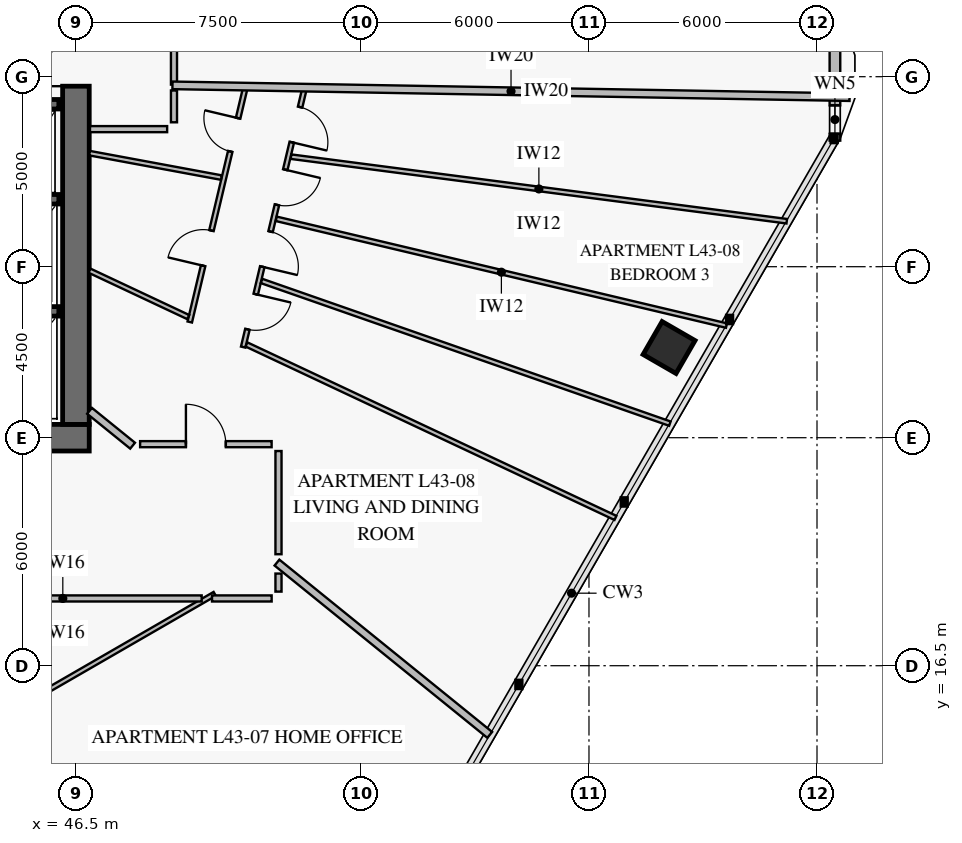
"""IFC4 building model, lengths in metres.
Left out: names, types, materials, properties, quantities, classifications, styles, units other than length and angle.
Written with IfcOpenShell. Run it as: python <this file> out.ifc"""

import sys

from ifc_helpers import new_model, si_unit, direction, frame, frame_2d, origin, origin_2d, place, context, subcontext, project, spatial, rectangle, extrude, element, fill, save


model = new_model("IFC4")
c1 = context("Model", 3, precision=1e-05, world=origin(), true_north=direction((0.0, 1.0)))
c2 = subcontext(c1, "Body", "Model", "MODEL_VIEW")
j1 = project(units=[si_unit("LENGTHUNIT", "METRE"), si_unit("PLANEANGLEUNIT", "RADIAN")], contexts=[c1])
p1 = place(None, origin())
s1 = spatial("IfcSite", under=j1, at=p1, CompositionType="ELEMENT")
p2 = place(p1, origin())
s2 = spatial("IfcBuilding", under=s1, at=p2, CompositionType="ELEMENT")
p3 = place(p2, frame((0.0, 0.0, 173.2)))
s3 = spatial("IfcBuildingStorey", under=s2, at=p3, CompositionType="ELEMENT", Elevation=173.2)
p4 = place(p3, frame((37.35, 22.5, 0.0), z_axis=(0.0, 0.0, 1.0), x_axis=(1.0, 0.0, 0.0)))
e1 = element("IfcWall", 1, at=p4, inside=s3, PredefinedType="SHEAR", context=c2, shape_type="SweptSolid", body=[
    extrude(rectangle(XDim=9.5, YDim=0.7, at=frame_2d((4.75, 0.0))), origin(), (0.0, 0.0, 1.0), 3.8),
])
p5 = place(p4, frame((3.95, 0.0, 0.0)))
e2 = element("IfcOpeningElement", 2, at=p5, cuts=e1, PredefinedType="OPENING", context=c2, shape_type="SweptSolid", body=[
    extrude(rectangle(XDim=1.5, YDim=2.15, at=frame_2d((0.75, 1.075))), frame((0.0, 0.362, 0.0), z_axis=(0.0, -1.0, 0.0), x_axis=(1.0, 0.0, 0.0)), (0.0, 0.0, 1.0), 0.724),
])
p6 = place(p3, frame((46.5, 22.85, 0.0), z_axis=(0.0, 0.0, 1.0), x_axis=(0.0, 1.0, 0.0)))
e3 = element("IfcWall", 3, at=p6, inside=s3, PredefinedType="SHEAR", context=c2, shape_type="SweptSolid", body=[
    extrude(rectangle(XDim=18.3, YDim=0.7, at=frame_2d((9.15, 0.0))), origin(), (0.0, 0.0, 1.0), 3.8),
])
p7 = place(p6, frame((8.9, 0.0, 0.0)))
e4 = element("IfcOpeningElement", 4, at=p7, cuts=e3, PredefinedType="OPENING", context=c2, shape_type="SweptSolid", body=[
    extrude(rectangle(XDim=1.1, YDim=2.15, at=frame_2d((0.55, 1.075))), frame((0.0, 0.362, 0.0), z_axis=(0.0, -1.0, 0.0), x_axis=(1.0, 0.0, 0.0)), (0.0, 0.0, 1.0), 0.724),
])
p8 = place(p3, frame((62.108, 24.874, 0.0), z_axis=(0.0, 0.0, 1.0), x_axis=(0.5, 0.866025403784, 0.0)))
e5 = element("IfcColumn", 5, at=p8, inside=s3, PredefinedType="COLUMN", context=c2, shape_type="SweptSolid", body=[
    extrude(rectangle(XDim=1.0, YDim=1.0, at=origin_2d()), origin(), (0.0, 0.0, 1.0), 3.55),
])
p9 = place(p3, frame((66.472, 33.683, 0.0), z_axis=(0.0, 0.0, 1.0), x_axis=(0.0, -1.0, 0.0)))
e6 = element("IfcWall", 6, at=p9, inside=s3, PredefinedType="SOLIDWALL", context=c2, shape_type="SweptSolid", body=[
    extrude(rectangle(XDim=3.365, YDim=0.28, at=frame_2d((1.683, 0.0))), origin(), (0.0, 0.0, 1.0), 3.55),
])
p10 = place(p9, frame((2.436, 0.0, 0.85)))
e7 = element("IfcOpeningElement", 7, at=p10, cuts=e6, PredefinedType="OPENING", context=c2, shape_type="SweptSolid", body=[
    extrude(rectangle(XDim=0.75, YDim=1.5, at=frame_2d((0.375, 0.75))), frame((0.0, 0.152, 0.0), z_axis=(0.0, -1.0, 0.0), x_axis=(1.0, 0.0, 0.0)), (0.0, 0.0, 1.0), 0.304),
])
p11 = place(p3, frame((25.95, 31.275, 0.0), z_axis=(0.0, 0.0, 1.0), x_axis=(1.0, 0.0, 0.0)))
e8 = element("IfcWall", 8, at=p11, inside=s3, PredefinedType="SOLIDWALL", context=c2, shape_type="SweptSolid", body=[
    extrude(rectangle(XDim=20.1, YDim=0.25, at=frame_2d((10.05, 0.0))), origin(), (0.0, 0.0, 1.0), 3.8),
])
p12 = place(p11, frame((2.6, 0.0, 0.0)))
e9 = element("IfcOpeningElement", 9, at=p12, cuts=e8, PredefinedType="OPENING", context=c2, shape_type="SweptSolid", body=[
    extrude(rectangle(XDim=1.1, YDim=2.15, at=frame_2d((0.55, 1.075))), frame((0.0, 0.137, 0.0), z_axis=(0.0, -1.0, 0.0), x_axis=(1.0, 0.0, 0.0)), (0.0, 0.0, 1.0), 0.274),
])
p13 = place(p11, frame((10.6, 0.0, 0.0)))
e10 = element("IfcOpeningElement", 10, at=p13, cuts=e8, PredefinedType="OPENING", context=c2, shape_type="SweptSolid", body=[
    extrude(rectangle(XDim=1.1, YDim=2.15, at=frame_2d((0.55, 1.075))), frame((0.0, 0.137, 0.0), z_axis=(0.0, -1.0, 0.0), x_axis=(1.0, 0.0, 0.0)), (0.0, 0.0, 1.0), 0.274),
])
p14 = place(p11, frame((16.35, 0.0, 0.0)))
e11 = element("IfcOpeningElement", 11, at=p14, cuts=e8, PredefinedType="OPENING", context=c2, shape_type="SweptSolid", body=[
    extrude(rectangle(XDim=1.1, YDim=2.15, at=frame_2d((0.55, 1.075))), frame((0.0, 0.137, 0.0), z_axis=(0.0, -1.0, 0.0), x_axis=(1.0, 0.0, 0.0)), (0.0, 0.0, 1.0), 0.274),
])
for number, where, z_axis, x_axis in (
    (12, (43.8, 25.825, 0.0), (0.0, 0.0, 1.0), (1.0, 0.0, 0.0)),
    (13, (43.8, 28.775, 0.0), (0.0, 0.0, 1.0), (1.0, 0.0, 0.0)),
):
    element("IfcWall", number, at=place(p3, frame(where, z_axis=z_axis, x_axis=x_axis)), inside=s3, PredefinedType="SOLIDWALL", context=c2, shape_type="SweptSolid", body=[
        extrude(rectangle(XDim=2.25, YDim=0.25, at=frame_2d((1.125, 0.0))), origin(), (0.0, 0.0, 1.0), 3.8),
    ])
p15 = place(p3, frame((44.036, 14.83, 0.0), z_axis=(0.0, 0.0, 1.0), x_axis=(0.423895538652, -0.905711086556, 0.0)))
e14 = element("IfcWall", 14, at=p15, inside=s3, PredefinedType="PARTITIONING", context=c2, shape_type="SweptSolid", body=[
    extrude(rectangle(XDim=8.413, YDim=0.12, at=frame_2d((4.207, 0.0))), origin(), (0.0, 0.0, 1.0), 2.87),
])
p16 = place(p15, frame((3.707, 0.0, 0.0)))
e15 = element("IfcOpeningElement", 15, at=p16, cuts=e14, PredefinedType="OPENING", context=c2, shape_type="SweptSolid", body=[
    extrude(rectangle(XDim=0.95, YDim=2.1, at=frame_2d((0.475, 1.05))), frame((0.0, 0.072, 0.0), z_axis=(0.0, -1.0, 0.0), x_axis=(1.0, 0.0, 0.0)), (0.0, 0.0, 1.0), 0.144),
])
p17 = place(p3, frame((49.496, 25.545, 0.0), z_axis=(0.0, 0.0, 1.0), x_axis=(0.230738150412, 0.973015881651, 0.0)))
e16 = element("IfcWall", 16, at=p17, inside=s3, PredefinedType="PARTITIONING", context=c2, shape_type="SweptSolid", body=[
    extrude(rectangle(XDim=6.335, YDim=0.12, at=frame_2d((3.167, 0.0))), origin(), (0.0, 0.0, 1.0), 2.9),
])
p18 = place(p17, frame((1.523, 0.0, 0.0)))
e17 = element("IfcOpeningElement", 17, at=p18, cuts=e16, PredefinedType="OPENING", context=c2, shape_type="SweptSolid", body=[
    extrude(rectangle(XDim=0.95, YDim=2.1, at=frame_2d((0.475, 1.05))), frame((0.0, 0.072, 0.0), z_axis=(0.0, -1.0, 0.0), x_axis=(1.0, 0.0, 0.0)), (0.0, 0.0, 1.0), 0.144),
])
p19 = place(p17, frame((4.613, 0.0, 0.0)))
e18 = element("IfcOpeningElement", 18, at=p19, cuts=e16, PredefinedType="OPENING", context=c2, shape_type="SweptSolid", body=[
    extrude(rectangle(XDim=0.9, YDim=2.1, at=frame_2d((0.45, 1.05))), frame((0.0, 0.072, 0.0), z_axis=(0.0, -1.0, 0.0), x_axis=(1.0, 0.0, 0.0)), (0.0, 0.0, 1.0), 0.144),
])
p20 = place(p3, frame((50.901, 24.884, 0.0), z_axis=(0.0, 0.0, 1.0), x_axis=(0.230727269758, 0.973018461793, 0.0)))
e19 = element("IfcWall", 19, at=p20, inside=s3, PredefinedType="PARTITIONING", context=c2, shape_type="SweptSolid", body=[
    extrude(rectangle(XDim=6.972, YDim=0.12, at=frame_2d((3.486, 0.0))), origin(), (0.0, 0.0, 1.0), 2.9),
])
p21 = place(p20, frame((0.481, 0.0, 0.0)))
e20 = element("IfcOpeningElement", 20, at=p21, cuts=e19, PredefinedType="OPENING", context=c2, shape_type="SweptSolid", body=[
    extrude(rectangle(XDim=0.95, YDim=2.1, at=frame_2d((0.475, 1.05))), frame((0.0, 0.072, 0.0), z_axis=(0.0, -1.0, 0.0), x_axis=(1.0, 0.0, 0.0)), (0.0, 0.0, 1.0), 0.144),
])
p22 = place(p20, frame((2.174, 0.0, 0.0)))
e21 = element("IfcOpeningElement", 21, at=p22, cuts=e19, PredefinedType="OPENING", context=c2, shape_type="SweptSolid", body=[
    extrude(rectangle(XDim=0.95, YDim=2.1, at=frame_2d((0.475, 1.05))), frame((0.0, 0.072, 0.0), z_axis=(0.0, -1.0, 0.0), x_axis=(1.0, 0.0, 0.0)), (0.0, 0.0, 1.0), 0.144),
])
p23 = place(p20, frame((3.848, 0.0, 0.0)))
e22 = element("IfcOpeningElement", 22, at=p23, cuts=e19, PredefinedType="OPENING", context=c2, shape_type="SweptSolid", body=[
    extrude(rectangle(XDim=0.95, YDim=2.1, at=frame_2d((0.475, 1.05))), frame((0.0, 0.072, 0.0), z_axis=(0.0, -1.0, 0.0), x_axis=(1.0, 0.0, 0.0)), (0.0, 0.0, 1.0), 0.144),
])
p24 = place(p20, frame((5.541, 0.0, 0.0)))
e23 = element("IfcOpeningElement", 23, at=p24, cuts=e19, PredefinedType="OPENING", context=c2, shape_type="SweptSolid", body=[
    extrude(rectangle(XDim=0.95, YDim=2.1, at=frame_2d((0.475, 1.05))), frame((0.0, 0.072, 0.0), z_axis=(0.0, -1.0, 0.0), x_axis=(1.0, 0.0, 0.0)), (0.0, 0.0, 1.0), 0.144),
])
p25 = place(p3, frame((51.649, 22.33, 0.0), z_axis=(0.0, 0.0, 1.0), x_axis=(-1.0, 0.0, 0.0)))
e24 = element("IfcWall", 24, at=p25, inside=s3, PredefinedType="PARTITIONING", context=c2, shape_type="SweptSolid", body=[
    extrude(rectangle(XDim=3.46, YDim=0.16, at=frame_2d((1.73, 0.0))), origin(), (0.0, 0.0, 1.0), 3.55),
])
p26 = place(p25, frame((1.205, 0.0, 0.0)))
e25 = element("IfcOpeningElement", 25, at=p26, cuts=e24, PredefinedType="OPENING", context=c2, shape_type="SweptSolid", body=[
    extrude(rectangle(XDim=1.05, YDim=2.15, at=frame_2d((0.525, 1.075))), frame((0.0, 0.092, 0.0), z_axis=(0.0, -1.0, 0.0), x_axis=(1.0, 0.0, 0.0)), (0.0, 0.0, 1.0), 0.184),
])
p27 = place(p3, frame((49.08, 31.792, 0.0), z_axis=(0.0, 0.0, 1.0), x_axis=(0.0, 1.0, 0.0)))
e26 = element("IfcWall", 26, at=p27, inside=s3, PredefinedType="PARTITIONING", context=c2, shape_type="SweptSolid", body=[
    extrude(rectangle(XDim=9.878, YDim=0.16, at=frame_2d((4.939, 0.0))), origin(), (0.0, 0.0, 1.0), 2.9),
])
p28 = place(p27, frame((4.364, 0.0, 0.0)))
e27 = element("IfcOpeningElement", 27, at=p28, cuts=e26, PredefinedType="OPENING", context=c2, shape_type="SweptSolid", body=[
    extrude(rectangle(XDim=1.15, YDim=2.2, at=frame_2d((0.575, 1.1))), frame((0.0, 0.092, 0.0), z_axis=(0.0, -1.0, 0.0), x_axis=(1.0, 0.0, 0.0)), (0.0, 0.0, 1.0), 0.184),
])
p29 = place(p3, frame((44.084, 14.886, 0.0), z_axis=(0.0, 0.0, 1.0), x_axis=(0.866034731829, 0.499983843005, 0.0)))
e28 = element("IfcWall", 28, at=p29, inside=s3, PredefinedType="PARTITIONING", context=c2, shape_type="SweptSolid", body=[
    extrude(rectangle(XDim=7.007, YDim=0.12, at=frame_2d((3.503, 0.0))), origin(), (0.0, 0.0, 1.0), 2.9),
])
p30 = place(p3, frame((46.858, 23.207, 0.0), z_axis=(0.0, 0.0, 1.0), x_axis=(0.777244870707, -0.629198228668, 0.0)))
e29 = element("IfcWall", 29, at=p30, inside=s3, PredefinedType="PARTITIONING", context=c2, shape_type="SweptSolid", body=[
    extrude(rectangle(XDim=1.458, YDim=0.2, at=frame_2d((0.729, 0.0))), origin(), (0.0, 0.0, 1.0), 3.55),
])
p31 = place(p3, frame((51.79, 19.213, 0.0), z_axis=(0.0, 0.0, 1.0), x_axis=(0.777161996324, -0.629300589122, 0.0)))
e30 = element("IfcWall", 30, at=p31, inside=s3, PredefinedType="PARTITIONING", context=c2, shape_type="SweptSolid", body=[
    extrude(rectangle(XDim=7.204, YDim=0.2, at=frame_2d((3.602, 0.0))), origin(), (0.0, 0.0, 1.0), 2.87),
])
p32 = place(p3, frame((46.858, 29.988, 0.0), z_axis=(0.0, 0.0, 1.0), x_axis=(0.983273284931, -0.182136342173, 0.0)))
e31 = element("IfcWall", 31, at=p32, inside=s3, PredefinedType="PARTITIONING", context=c2, shape_type="SweptSolid", body=[
    extrude(rectangle(XDim=3.528, YDim=0.12, at=frame_2d((1.764, 0.0))), origin(), (0.0, 0.0, 1.0), 3.55),
])
p33 = place(p3, frame((51.384, 26.625, 0.0), z_axis=(0.0, 0.0, 1.0), x_axis=(0.944033449878, -0.329849731714, 0.0)))
e32 = element("IfcWall", 32, at=p33, inside=s3, PredefinedType="PARTITIONING", context=c2, shape_type="SweptSolid", body=[
    extrude(rectangle(XDim=11.382, YDim=0.12, at=frame_2d((5.691, 0.0))), origin(), (0.0, 0.0, 1.0), 2.87),
])
p34 = place(p3, frame((51.772, 28.26, 0.0), z_axis=(0.0, 0.0, 1.0), x_axis=(0.973016228648, -0.230736687131, 0.0)))
e33 = element("IfcWall", 33, at=p34, inside=s3, PredefinedType="PARTITIONING", context=c2, shape_type="SweptSolid", body=[
    extrude(rectangle(XDim=12.176, YDim=0.12, at=frame_2d((6.088, 0.0))), origin(), (0.0, 0.0, 1.0), 2.87),
])
p35 = place(p3, frame((52.159, 29.896, 0.0), z_axis=(0.0, 0.0, 1.0), x_axis=(0.991627193539, -0.129133686673, 0.0)))
e34 = element("IfcWall", 34, at=p35, inside=s3, PredefinedType="PARTITIONING", context=c2, shape_type="SweptSolid", body=[
    extrude(rectangle(XDim=13.155, YDim=0.12, at=frame_2d((6.577, 0.0))), origin(), (0.0, 0.0, 1.0), 2.87),
])
p36 = place(p3, frame((46.858, 26.895, 0.0), z_axis=(0.0, 0.0, 1.0), x_axis=(0.904965101131, -0.425485799686, 0.0)))
e35 = element("IfcWall", 35, at=p36, inside=s3, PredefinedType="PARTITIONING", context=c2, shape_type="SweptSolid", body=[
    extrude(rectangle(XDim=2.871, YDim=0.12, at=frame_2d((1.436, 0.0))), origin(), (0.0, 0.0, 1.0), 3.55),
])
p37 = place(p3, frame((50.988, 24.954, 0.0), z_axis=(0.0, 0.0, 1.0), x_axis=(0.904984187351, -0.42544520287, 0.0)))
e36 = element("IfcWall", 36, at=p37, inside=s3, PredefinedType="PARTITIONING", context=c2, shape_type="SweptSolid", body=[
    extrude(rectangle(XDim=10.728, YDim=0.12, at=frame_2d((5.364, 0.0))), origin(), (0.0, 0.0, 1.0), 2.87),
])
p38 = place(p3, frame((49.04, 31.772, 0.0), z_axis=(0.0, 0.0, 1.0), x_axis=(0.999847668402, -0.017453939101, 0.0)))
e37 = element("IfcWall", 37, at=p38, inside=s3, PredefinedType="PARTITIONING", context=c2, shape_type="SweptSolid", body=[
    extrude(rectangle(XDim=17.82, YDim=0.2, at=frame_2d((8.91, 0.0))), origin(), (0.0, 0.0, 1.0), 2.87),
])
p39 = place(p3, frame((42.501, 18.27, 0.0), z_axis=(0.0, 0.0, 1.0), x_axis=(1.0, 0.0, 0.0)))
e38 = element("IfcWall", 38, at=p39, inside=s3, PredefinedType="PARTITIONING", context=c2, shape_type="SweptSolid", body=[
    extrude(rectangle(XDim=7.308, YDim=0.16, at=frame_2d((3.654, 0.0))), origin(), (0.0, 0.0, 1.0), 2.9),
])
p40 = place(p3, frame((50.081, 18.27, 0.0), z_axis=(0.0, 0.0, 1.0), x_axis=(1.0, 0.0, 0.0)))
e39 = element("IfcWall", 39, at=p40, inside=s3, PredefinedType="PARTITIONING", context=c2, shape_type="SweptSolid", body=[
    extrude(rectangle(XDim=1.569, YDim=0.16, at=frame_2d((0.785, 0.0))), origin(), (0.0, 0.0, 1.0), 3.15),
])
p41 = place(p3, frame((51.83, 18.45, 0.0), z_axis=(0.0, 0.0, 1.0), x_axis=(0.0, 1.0, 0.0)))
e40 = element("IfcWall", 40, at=p41, inside=s3, PredefinedType="PARTITIONING", context=c2, shape_type="SweptSolid", body=[
    extrude(rectangle(XDim=0.475, YDim=0.16, at=frame_2d((0.237, 0.0))), origin(), (0.0, 0.0, 1.0), 3.55),
])
p42 = place(p3, frame((51.83, 19.434, 0.0), z_axis=(0.0, 0.0, 1.0), x_axis=(0.0, 1.0, 0.0)))
e41 = element("IfcWall", 41, at=p42, inside=s3, PredefinedType="PARTITIONING", context=c2, shape_type="SweptSolid", body=[
    extrude(rectangle(XDim=2.716, YDim=0.16, at=frame_2d((1.358, 0.0))), origin(), (0.0, 0.0, 1.0), 3.15),
])
p43 = place(p3, frame((46.87, 30.62, 0.0), z_axis=(0.0, 0.0, 1.0), x_axis=(1.0, 0.0, 0.0)))
e42 = element("IfcWall", 42, at=p43, inside=s3, PredefinedType="PARTITIONING", context=c2, shape_type="SweptSolid", body=[
    extrude(rectangle(XDim=2.03, YDim=0.16, at=frame_2d((1.015, 0.0))), origin(), (0.0, 0.0, 1.0), 3.55),
])
p44 = place(p3, frame((49.08, 30.8, 0.0), z_axis=(0.0, 0.0, 1.0), x_axis=(0.0, 1.0, 0.0)))
e43 = element("IfcWall", 43, at=p44, inside=s3, PredefinedType="PARTITIONING", context=c2, shape_type="SweptSolid", body=[
    extrude(rectangle(XDim=0.837, YDim=0.16, at=frame_2d((0.419, 0.0))), origin(), (0.0, 0.0, 1.0), 3.55),
])
p45 = place(p10, origin())
e44 = element("IfcWindow", 44, at=p45, inside=s3, PartitioningType="SINGLE_PANEL", PredefinedType="WINDOW", context=c2, shape_type="SweptSolid", body=[
    extrude(rectangle(XDim=0.75, YDim=1.5, at=frame_2d((0.375, 0.75))), frame((0.0, 0.03, 0.0), z_axis=(0.0, -1.0, 0.0), x_axis=(1.0, 0.0, 0.0)), (0.0, 0.0, 1.0), 0.06),
])
fill(e7, e44)
p46 = place(p7, origin())
e45 = element("IfcDoor", 45, at=p46, inside=s3, OperationType="SINGLE_SWING_LEFT", PredefinedType="USERDEFINED", context=c2, shape_type="SweptSolid", body=[
    extrude(rectangle(XDim=1.1, YDim=2.15, at=frame_2d((0.55, 1.075))), frame((0.0, 0.025, 0.0), z_axis=(0.0, -1.0, 0.0), x_axis=(1.0, 0.0, 0.0)), (0.0, 0.0, 1.0), 0.05),
])
fill(e4, e45)
p47 = place(p18, origin())
e46 = element("IfcDoor", 46, at=p47, inside=s3, OperationType="SINGLE_SWING_LEFT", PredefinedType="DOOR", context=c2, shape_type="SweptSolid", body=[
    extrude(rectangle(XDim=0.95, YDim=2.1, at=frame_2d((0.475, 1.05))), frame((0.0, 0.025, 0.0), z_axis=(0.0, -1.0, 0.0), x_axis=(1.0, 0.0, 0.0)), (0.0, 0.0, 1.0), 0.05),
])
fill(e17, e46)
p48 = place(p19, origin())
e47 = element("IfcDoor", 47, at=p48, inside=s3, OperationType="SINGLE_SWING_RIGHT", PredefinedType="DOOR", context=c2, shape_type="SweptSolid", body=[
    extrude(rectangle(XDim=0.9, YDim=2.1, at=frame_2d((0.45, 1.05))), frame((0.0, 0.025, 0.0), z_axis=(0.0, -1.0, 0.0), x_axis=(1.0, 0.0, 0.0)), (0.0, 0.0, 1.0), 0.05),
])
fill(e18, e47)
p49 = place(p21, frame((0.95, 0.0, 0.0), z_axis=(0.0, 0.0, 1.0), x_axis=(-1.0, 0.0, 0.0)))
e48 = element("IfcDoor", 48, at=p49, inside=s3, OperationType="SINGLE_SWING_LEFT", PredefinedType="DOOR", context=c2, shape_type="SweptSolid", body=[
    extrude(rectangle(XDim=0.95, YDim=2.1, at=frame_2d((0.475, 1.05))), frame((0.0, 0.025, 0.0), z_axis=(0.0, -1.0, 0.0), x_axis=(1.0, 0.0, 0.0)), (0.0, 0.0, 1.0), 0.05),
])
fill(e20, e48)
p50 = place(p22, frame((0.95, 0.0, 0.0), z_axis=(0.0, 0.0, 1.0), x_axis=(-1.0, 0.0, 0.0)))
e49 = element("IfcDoor", 49, at=p50, inside=s3, OperationType="SINGLE_SWING_RIGHT", PredefinedType="DOOR", context=c2, shape_type="SweptSolid", body=[
    extrude(rectangle(XDim=0.95, YDim=2.1, at=frame_2d((0.475, 1.05))), frame((0.0, 0.025, 0.0), z_axis=(0.0, -1.0, 0.0), x_axis=(1.0, 0.0, 0.0)), (0.0, 0.0, 1.0), 0.05),
])
fill(e21, e49)
p51 = place(p23, frame((0.95, 0.0, 0.0), z_axis=(0.0, 0.0, 1.0), x_axis=(-1.0, 0.0, 0.0)))
e50 = element("IfcDoor", 50, at=p51, inside=s3, OperationType="SINGLE_SWING_LEFT", PredefinedType="DOOR", context=c2, shape_type="SweptSolid", body=[
    extrude(rectangle(XDim=0.95, YDim=2.1, at=frame_2d((0.475, 1.05))), frame((0.0, 0.025, 0.0), z_axis=(0.0, -1.0, 0.0), x_axis=(1.0, 0.0, 0.0)), (0.0, 0.0, 1.0), 0.05),
])
fill(e22, e50)
p52 = place(p24, frame((0.95, 0.0, 0.0), z_axis=(0.0, 0.0, 1.0), x_axis=(-1.0, 0.0, 0.0)))
e51 = element("IfcDoor", 51, at=p52, inside=s3, OperationType="SINGLE_SWING_RIGHT", PredefinedType="DOOR", context=c2, shape_type="SweptSolid", body=[
    extrude(rectangle(XDim=0.95, YDim=2.1, at=frame_2d((0.475, 1.05))), frame((0.0, 0.025, 0.0), z_axis=(0.0, -1.0, 0.0), x_axis=(1.0, 0.0, 0.0)), (0.0, 0.0, 1.0), 0.05),
])
fill(e23, e51)
p53 = place(p26, frame((1.05, 0.0, 0.0), z_axis=(0.0, 0.0, 1.0), x_axis=(-1.0, 0.0, 0.0)))
e52 = element("IfcDoor", 52, at=p53, inside=s3, OperationType="SINGLE_SWING_LEFT", PredefinedType="DOOR", context=c2, shape_type="SweptSolid", body=[
    extrude(rectangle(XDim=1.05, YDim=2.15, at=frame_2d((0.525, 1.075))), frame((0.0, 0.025, 0.0), z_axis=(0.0, -1.0, 0.0), x_axis=(1.0, 0.0, 0.0)), (0.0, 0.0, 1.0), 0.05),
])
fill(e25, e52)
save(model, sys.argv[1])
